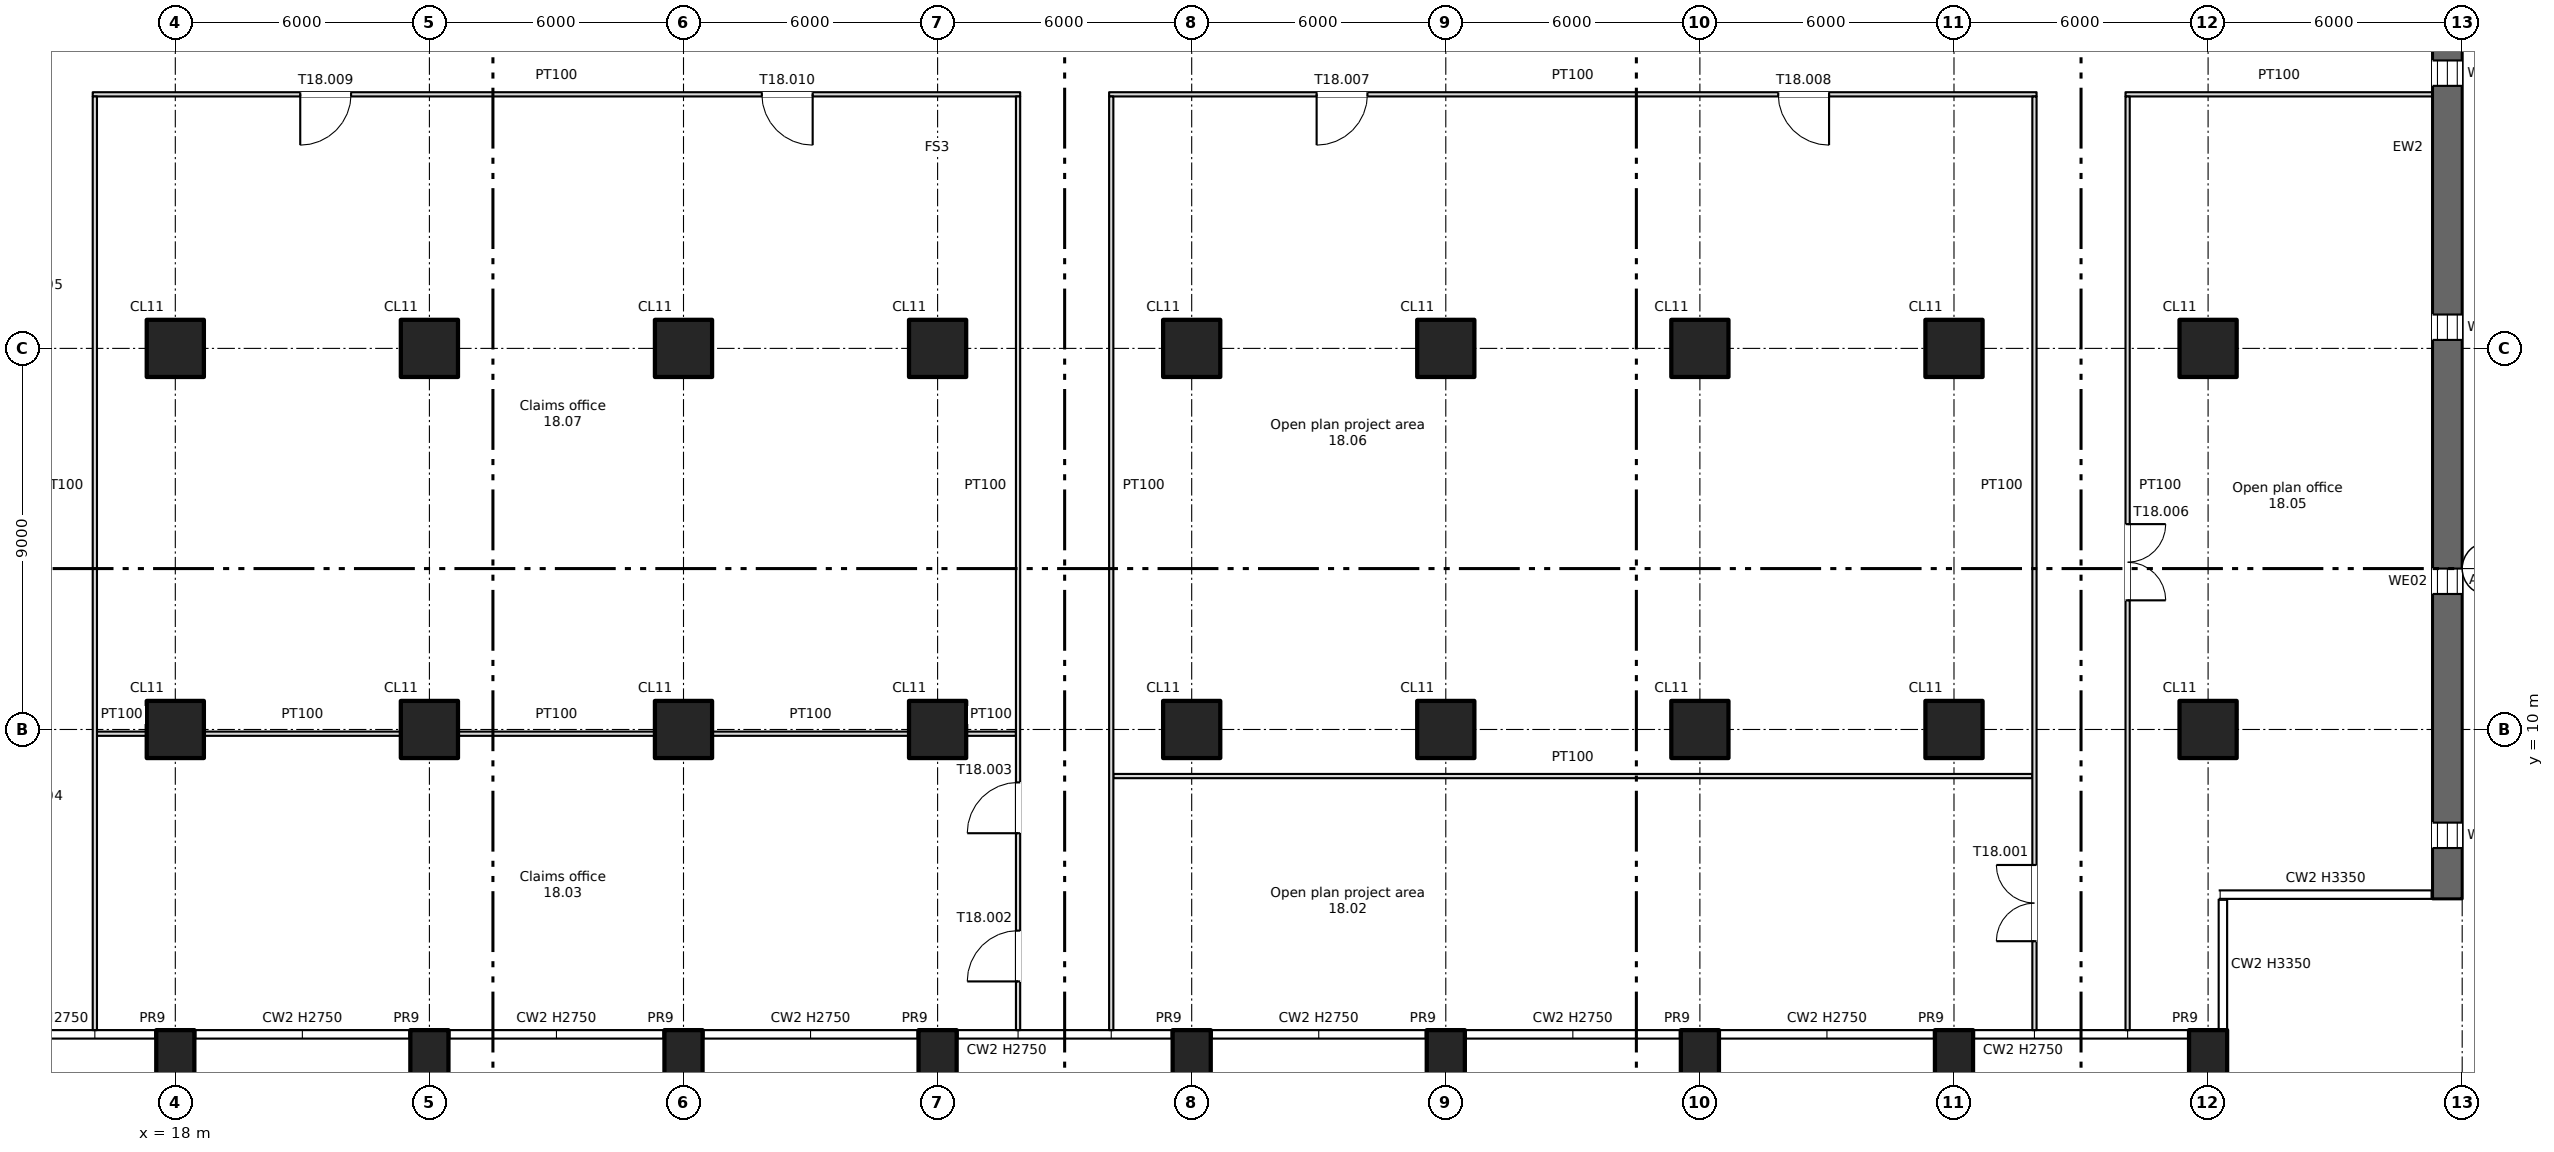
"""IFC4 building model, lengths in metres.
Left out: names, types, materials, properties, quantities, classifications, styles, units other than length and angle.
Written with IfcOpenShell. Run it as: python <this file> out.ifc"""

import sys

from ifc_helpers import new_model, si_unit, direction, frame, frame_2d, origin, origin_2d, place, context, subcontext, project, spatial, rectangle, extrude, element, fill, save


model = new_model("IFC4")
c1 = context("Model", 3, precision=1e-05, world=origin(), true_north=direction((0.0, 1.0)))
c2 = subcontext(c1, "Body", "Model", "MODEL_VIEW")
j1 = project(units=[si_unit("LENGTHUNIT", "METRE"), si_unit("PLANEANGLEUNIT", "RADIAN")], contexts=[c1])
p1 = place(None, origin())
s1 = spatial("IfcSite", under=j1, at=p1, CompositionType="ELEMENT")
p2 = place(p1, origin())
s2 = spatial("IfcBuilding", under=s1, at=p2, CompositionType="ELEMENT")
p3 = place(p2, frame((0.0, 0.0, 113.75)))
s3 = spatial("IfcBuildingStorey", under=s2, at=p3, CompositionType="ELEMENT", Elevation=113.75)
for number, where, z_axis, x_axis in (
    (1, (18.0, 2.2, -0.4), (0.0, 0.0, 1.0), (1.0, 0.0, 0.0)),
    (2, (24.0, 2.2, -0.4), (0.0, 0.0, 1.0), (1.0, 0.0, 0.0)),
    (3, (30.0, 2.2, -0.4), (0.0, 0.0, 1.0), (1.0, 0.0, 0.0)),
    (4, (36.0, 2.2, -0.4), (0.0, 0.0, 1.0), (1.0, 0.0, 0.0)),
    (5, (42.0, 2.2, -0.4), (0.0, 0.0, 1.0), (1.0, 0.0, 0.0)),
    (6, (48.0, 2.2, -0.4), (0.0, 0.0, 1.0), (1.0, 0.0, 0.0)),
    (7, (54.0, 2.2, -0.4), (0.0, 0.0, 1.0), (1.0, 0.0, 0.0)),
    (8, (60.0, 2.2, -0.4), (0.0, 0.0, 1.0), (1.0, 0.0, 0.0)),
    (9, (66.0, 2.2, -0.4), (0.0, 0.0, 1.0), (1.0, 0.0, 0.0)),
):
    element("IfcColumn", number, at=place(p3, frame(where, z_axis=z_axis, x_axis=x_axis)), inside=s3, PredefinedType="COLUMN", context=c2, shape_type="SweptSolid", body=[
        extrude(rectangle(XDim=0.9, YDim=1.4, at=origin_2d()), origin(), (0.0, 0.0, 1.0), 3.75),
    ])
for number, where, z_axis, x_axis in (
    (10, (18.0, 10.0, 0.0), (0.0, 0.0, 1.0), (1.0, 0.0, 0.0)),
    (11, (18.0, 19.0, 0.0), (0.0, 0.0, 1.0), (1.0, 0.0, 0.0)),
    (12, (24.0, 10.0, 0.0), (0.0, 0.0, 1.0), (1.0, 0.0, 0.0)),
    (13, (24.0, 19.0, 0.0), (0.0, 0.0, 1.0), (1.0, 0.0, 0.0)),
    (14, (30.0, 10.0, 0.0), (0.0, 0.0, 1.0), (1.0, 0.0, 0.0)),
    (15, (30.0, 19.0, 0.0), (0.0, 0.0, 1.0), (1.0, 0.0, 0.0)),
    (16, (36.0, 10.0, 0.0), (0.0, 0.0, 1.0), (1.0, 0.0, 0.0)),
    (17, (36.0, 19.0, 0.0), (0.0, 0.0, 1.0), (1.0, 0.0, 0.0)),
    (18, (42.0, 10.0, 0.0), (0.0, 0.0, 1.0), (1.0, 0.0, 0.0)),
    (19, (42.0, 19.0, 0.0), (0.0, 0.0, 1.0), (1.0, 0.0, 0.0)),
    (20, (48.0, 10.0, 0.0), (0.0, 0.0, 1.0), (1.0, 0.0, 0.0)),
    (21, (48.0, 19.0, 0.0), (0.0, 0.0, 1.0), (1.0, 0.0, 0.0)),
    (22, (54.0, 10.0, 0.0), (0.0, 0.0, 1.0), (1.0, 0.0, 0.0)),
    (23, (54.0, 19.0, 0.0), (0.0, 0.0, 1.0), (1.0, 0.0, 0.0)),
    (24, (60.0, 10.0, 0.0), (0.0, 0.0, 1.0), (1.0, 0.0, 0.0)),
    (25, (60.0, 19.0, 0.0), (0.0, 0.0, 1.0), (1.0, 0.0, 0.0)),
    (26, (66.0, 10.0, 0.0), (0.0, 0.0, 1.0), (1.0, 0.0, 0.0)),
    (27, (66.0, 19.0, 0.0), (0.0, 0.0, 1.0), (1.0, 0.0, 0.0)),
):
    element("IfcColumn", number, at=place(p3, frame(where, z_axis=z_axis, x_axis=x_axis)), inside=s3, PredefinedType="COLUMN", context=c2, shape_type="SweptSolid", body=[
        extrude(rectangle(XDim=1.35, YDim=1.35, at=origin_2d()), origin(), (0.0, 0.0, 1.0), 3.35),
    ])
p4 = place(p3, frame((71.65, 6.0, 0.0), z_axis=(0.0, 0.0, 1.0), x_axis=(0.0, 1.0, 0.0)))
e28 = element("IfcWall", 28, at=p4, inside=s3, PredefinedType="SHEAR", context=c2, shape_type="SweptSolid", body=[
    extrude(rectangle(XDim=35.5, YDim=0.7, at=frame_2d((17.75, 0.0))), origin(), (0.0, 0.0, 1.0), 3.35),
])
p5 = place(p4, frame((1.2, 0.0, 0.6)))
e29 = element("IfcOpeningElement", 29, at=p5, cuts=e28, PredefinedType="OPENING", context=c2, shape_type="SweptSolid", body=[
    extrude(rectangle(XDim=0.6, YDim=2.4, at=frame_2d((0.3, 1.2))), frame((0.0, 0.36, 0.0), z_axis=(0.0, -1.0, 0.0), x_axis=(1.0, 0.0, 0.0)), (0.0, 0.0, 1.0), 0.72),
])
p6 = place(p4, frame((7.2, 0.0, 0.6)))
e30 = element("IfcOpeningElement", 30, at=p6, cuts=e28, PredefinedType="OPENING", context=c2, shape_type="SweptSolid", body=[
    extrude(rectangle(XDim=0.6, YDim=2.4, at=frame_2d((0.3, 1.2))), frame((0.0, 0.36, 0.0), z_axis=(0.0, -1.0, 0.0), x_axis=(1.0, 0.0, 0.0)), (0.0, 0.0, 1.0), 0.72),
])
p7 = place(p4, frame((13.2, 0.0, 0.6)))
e31 = element("IfcOpeningElement", 31, at=p7, cuts=e28, PredefinedType="OPENING", context=c2, shape_type="SweptSolid", body=[
    extrude(rectangle(XDim=0.6, YDim=2.4, at=frame_2d((0.3, 1.2))), frame((0.0, 0.36, 0.0), z_axis=(0.0, -1.0, 0.0), x_axis=(1.0, 0.0, 0.0)), (0.0, 0.0, 1.0), 0.72),
])
p8 = place(p4, frame((19.2, 0.0, 0.6)))
e32 = element("IfcOpeningElement", 32, at=p8, cuts=e28, PredefinedType="OPENING", context=c2, shape_type="SweptSolid", body=[
    extrude(rectangle(XDim=0.6, YDim=2.4, at=frame_2d((0.3, 1.2))), frame((0.0, 0.36, 0.0), z_axis=(0.0, -1.0, 0.0), x_axis=(1.0, 0.0, 0.0)), (0.0, 0.0, 1.0), 0.72),
])
p9 = place(p4, frame((25.2, 0.0, 0.6)))
e33 = element("IfcOpeningElement", 33, at=p9, cuts=e28, PredefinedType="OPENING", context=c2, shape_type="SweptSolid", body=[
    extrude(rectangle(XDim=0.6, YDim=2.4, at=frame_2d((0.3, 1.2))), frame((0.0, 0.36, 0.0), z_axis=(0.0, -1.0, 0.0), x_axis=(1.0, 0.0, 0.0)), (0.0, 0.0, 1.0), 0.72),
])
p10 = place(p4, frame((31.2, 0.0, 0.6)))
e34 = element("IfcOpeningElement", 34, at=p10, cuts=e28, PredefinedType="OPENING", context=c2, shape_type="SweptSolid", body=[
    extrude(rectangle(XDim=0.6, YDim=2.4, at=frame_2d((0.3, 1.2))), frame((0.0, 0.36, 0.0), z_axis=(0.0, -1.0, 0.0), x_axis=(1.0, 0.0, 0.0)), (0.0, 0.0, 1.0), 0.72),
])
p11 = place(p3, frame((40.15, 8.9, 0.0), z_axis=(0.0, 0.0, 1.0), x_axis=(1.0, 0.0, 0.0)))
e35 = element("IfcWall", 35, at=p11, inside=s3, PredefinedType="PARTITIONING", context=c2, shape_type="SweptSolid", body=[
    extrude(rectangle(XDim=21.7, YDim=0.1, at=frame_2d((10.85, 0.0))), origin(), (0.0, 0.0, 1.0), 3.35),
])
p12 = place(p3, frame((36.675, 9.9, 0.0), z_axis=(0.0, 0.0, 1.0), x_axis=(1.0, 0.0, 0.0)))
e36 = element("IfcWall", 36, at=p12, inside=s3, PredefinedType="PARTITIONING", context=c2, shape_type="SweptSolid", body=[
    extrude(rectangle(XDim=1.175, YDim=0.1, at=frame_2d((0.587, 0.0))), origin(), (0.0, 0.0, 1.0), 3.35),
])
for number, where, z_axis, x_axis in (
    (37, (30.675, 9.9, 0.0), (0.0, 0.0, 1.0), (1.0, 0.0, 0.0)),
    (38, (24.675, 9.9, 0.0), (0.0, 0.0, 1.0), (1.0, 0.0, 0.0)),
    (39, (18.675, 9.9, 0.0), (0.0, 0.0, 1.0), (1.0, 0.0, 0.0)),
):
    element("IfcWall", number, at=place(p3, frame(where, z_axis=z_axis, x_axis=x_axis)), inside=s3, PredefinedType="PARTITIONING", context=c2, shape_type="SweptSolid", body=[
        extrude(rectangle(XDim=4.65, YDim=0.1, at=frame_2d((2.325, 0.0))), origin(), (0.0, 0.0, 1.0), 3.35),
    ])
p13 = place(p3, frame((16.15, 9.9, 0.0), z_axis=(0.0, 0.0, 1.0), x_axis=(1.0, 0.0, 0.0)))
e40 = element("IfcWall", 40, at=p13, inside=s3, PredefinedType="PARTITIONING", context=c2, shape_type="SweptSolid", body=[
    extrude(rectangle(XDim=1.175, YDim=0.1, at=frame_2d((0.587, 0.0))), origin(), (0.0, 0.0, 1.0), 3.35),
])
p14 = place(p3, frame((16.05, 25.0, 0.0), z_axis=(0.0, 0.0, 1.0), x_axis=(1.0, 0.0, 0.0)))
e41 = element("IfcWall", 41, at=p14, inside=s3, PredefinedType="PARTITIONING", context=c2, shape_type="SweptSolid", body=[
    extrude(rectangle(XDim=21.9, YDim=0.1, at=frame_2d((10.95, 0.0))), origin(), (0.0, 0.0, 1.0), 3.35),
])
p15 = place(p14, frame((4.9, 0.0, 0.0)))
e42 = element("IfcOpeningElement", 42, at=p15, cuts=e41, PredefinedType="OPENING", context=c2, shape_type="SweptSolid", body=[
    extrude(rectangle(XDim=1.2, YDim=2.1, at=frame_2d((0.6, 1.05))), frame((0.0, 0.06, 0.0), z_axis=(0.0, -1.0, 0.0), x_axis=(1.0, 0.0, 0.0)), (0.0, 0.0, 1.0), 0.12),
])
p16 = place(p14, frame((15.8, 0.0, 0.0)))
e43 = element("IfcOpeningElement", 43, at=p16, cuts=e41, PredefinedType="OPENING", context=c2, shape_type="SweptSolid", body=[
    extrude(rectangle(XDim=1.2, YDim=2.1, at=frame_2d((0.6, 1.05))), frame((0.0, 0.06, 0.0), z_axis=(0.0, -1.0, 0.0), x_axis=(1.0, 0.0, 0.0)), (0.0, 0.0, 1.0), 0.12),
])
p17 = place(p3, frame((40.05, 25.0, 0.0), z_axis=(0.0, 0.0, 1.0), x_axis=(1.0, 0.0, 0.0)))
e44 = element("IfcWall", 44, at=p17, inside=s3, PredefinedType="PARTITIONING", context=c2, shape_type="SweptSolid", body=[
    extrude(rectangle(XDim=21.9, YDim=0.1, at=frame_2d((10.95, 0.0))), origin(), (0.0, 0.0, 1.0), 3.35),
])
p18 = place(p17, frame((4.9, 0.0, 0.0)))
e45 = element("IfcOpeningElement", 45, at=p18, cuts=e44, PredefinedType="OPENING", context=c2, shape_type="SweptSolid", body=[
    extrude(rectangle(XDim=1.2, YDim=2.1, at=frame_2d((0.6, 1.05))), frame((0.0, 0.06, 0.0), z_axis=(0.0, -1.0, 0.0), x_axis=(1.0, 0.0, 0.0)), (0.0, 0.0, 1.0), 0.12),
])
p19 = place(p17, frame((15.8, 0.0, 0.0)))
e46 = element("IfcOpeningElement", 46, at=p19, cuts=e44, PredefinedType="OPENING", context=c2, shape_type="SweptSolid", body=[
    extrude(rectangle(XDim=1.2, YDim=2.1, at=frame_2d((0.6, 1.05))), frame((0.0, 0.06, 0.0), z_axis=(0.0, -1.0, 0.0), x_axis=(1.0, 0.0, 0.0)), (0.0, 0.0, 1.0), 0.12),
])
p20 = place(p3, frame((64.05, 25.0, 0.0), z_axis=(0.0, 0.0, 1.0), x_axis=(1.0, 0.0, 0.0)))
e47 = element("IfcWall", 47, at=p20, inside=s3, PredefinedType="PARTITIONING", context=c2, shape_type="SweptSolid", body=[
    extrude(rectangle(XDim=7.25, YDim=0.1, at=frame_2d((3.625, 0.0))), origin(), (0.0, 0.0, 1.0), 3.35),
])
p21 = place(p3, frame((16.1, 2.9, 0.0), z_axis=(0.0, 0.0, 1.0), x_axis=(0.0, 1.0, 0.0)))
e48 = element("IfcWall", 48, at=p21, inside=s3, PredefinedType="PARTITIONING", context=c2, shape_type="SweptSolid", body=[
    extrude(rectangle(XDim=22.05, YDim=0.1, at=frame_2d((11.025, 0.0))), origin(), (0.0, 0.0, 1.0), 3.35),
])
p22 = place(p3, frame((37.9, 2.9, 0.0), z_axis=(0.0, 0.0, 1.0), x_axis=(0.0, 1.0, 0.0)))
e49 = element("IfcWall", 49, at=p22, inside=s3, PredefinedType="PARTITIONING", context=c2, shape_type="SweptSolid", body=[
    extrude(rectangle(XDim=22.05, YDim=0.1, at=frame_2d((11.025, 0.0))), origin(), (0.0, 0.0, 1.0), 3.35),
])
p23 = place(p22, frame((1.15, 0.0, 0.0)))
e50 = element("IfcOpeningElement", 50, at=p23, cuts=e49, PredefinedType="OPENING", context=c2, shape_type="SweptSolid", body=[
    extrude(rectangle(XDim=1.2, YDim=2.1, at=frame_2d((0.6, 1.05))), frame((0.0, 0.06, 0.0), z_axis=(0.0, -1.0, 0.0), x_axis=(1.0, 0.0, 0.0)), (0.0, 0.0, 1.0), 0.12),
])
p24 = place(p22, frame((4.65, 0.0, 0.0)))
e51 = element("IfcOpeningElement", 51, at=p24, cuts=e49, PredefinedType="OPENING", context=c2, shape_type="SweptSolid", body=[
    extrude(rectangle(XDim=1.2, YDim=2.1, at=frame_2d((0.6, 1.05))), frame((0.0, 0.06, 0.0), z_axis=(0.0, -1.0, 0.0), x_axis=(1.0, 0.0, 0.0)), (0.0, 0.0, 1.0), 0.12),
])
p25 = place(p3, frame((40.1, 2.9, 0.0), z_axis=(0.0, 0.0, 1.0), x_axis=(0.0, 1.0, 0.0)))
e52 = element("IfcWall", 52, at=p25, inside=s3, PredefinedType="PARTITIONING", context=c2, shape_type="SweptSolid", body=[
    extrude(rectangle(XDim=22.05, YDim=0.1, at=frame_2d((11.025, 0.0))), origin(), (0.0, 0.0, 1.0), 3.35),
])
p26 = place(p3, frame((61.9, 2.9, 0.0), z_axis=(0.0, 0.0, 1.0), x_axis=(0.0, 1.0, 0.0)))
e53 = element("IfcWall", 53, at=p26, inside=s3, PredefinedType="PARTITIONING", context=c2, shape_type="SweptSolid", body=[
    extrude(rectangle(XDim=22.05, YDim=0.1, at=frame_2d((11.025, 0.0))), origin(), (0.0, 0.0, 1.0), 3.35),
])
p27 = place(p26, frame((2.1, 0.0, 0.0)))
e54 = element("IfcOpeningElement", 54, at=p27, cuts=e53, PredefinedType="OPENING", context=c2, shape_type="SweptSolid", body=[
    extrude(rectangle(XDim=1.8, YDim=2.1, at=frame_2d((0.9, 1.05))), frame((0.0, 0.06, 0.0), z_axis=(0.0, -1.0, 0.0), x_axis=(1.0, 0.0, 0.0)), (0.0, 0.0, 1.0), 0.12),
])
p28 = place(p3, frame((64.1, 2.9, 0.0), z_axis=(0.0, 0.0, 1.0), x_axis=(0.0, 1.0, 0.0)))
e55 = element("IfcWall", 55, at=p28, inside=s3, PredefinedType="PARTITIONING", context=c2, shape_type="SweptSolid", body=[
    extrude(rectangle(XDim=22.05, YDim=0.1, at=frame_2d((11.025, 0.0))), origin(), (0.0, 0.0, 1.0), 3.35),
])
p29 = place(p28, frame((10.15, 0.0, 0.0)))
e56 = element("IfcOpeningElement", 56, at=p29, cuts=e55, PredefinedType="OPENING", context=c2, shape_type="SweptSolid", body=[
    extrude(rectangle(XDim=1.8, YDim=2.1, at=frame_2d((0.9, 1.05))), frame((0.0, 0.06, 0.0), z_axis=(0.0, -1.0, 0.0), x_axis=(1.0, 0.0, 0.0)), (0.0, 0.0, 1.0), 0.12),
])
p30 = place(p5, origin())
e57 = element("IfcWindow", 57, at=p30, inside=s3, PartitioningType="SINGLE_PANEL", PredefinedType="WINDOW", context=c2, shape_type="SweptSolid", body=[
    extrude(rectangle(XDim=0.6, YDim=2.4, at=frame_2d((0.3, 1.2))), frame((0.0, 0.03, 0.0), z_axis=(0.0, -1.0, 0.0), x_axis=(1.0, 0.0, 0.0)), (0.0, 0.0, 1.0), 0.06),
])
fill(e29, e57)
p31 = place(p6, origin())
e58 = element("IfcWindow", 58, at=p31, inside=s3, PartitioningType="SINGLE_PANEL", PredefinedType="WINDOW", context=c2, shape_type="SweptSolid", body=[
    extrude(rectangle(XDim=0.6, YDim=2.4, at=frame_2d((0.3, 1.2))), frame((0.0, 0.03, 0.0), z_axis=(0.0, -1.0, 0.0), x_axis=(1.0, 0.0, 0.0)), (0.0, 0.0, 1.0), 0.06),
])
fill(e30, e58)
p32 = place(p7, origin())
e59 = element("IfcWindow", 59, at=p32, inside=s3, PartitioningType="SINGLE_PANEL", PredefinedType="WINDOW", context=c2, shape_type="SweptSolid", body=[
    extrude(rectangle(XDim=0.6, YDim=2.4, at=frame_2d((0.3, 1.2))), frame((0.0, 0.03, 0.0), z_axis=(0.0, -1.0, 0.0), x_axis=(1.0, 0.0, 0.0)), (0.0, 0.0, 1.0), 0.06),
])
fill(e31, e59)
p33 = place(p8, origin())
e60 = element("IfcWindow", 60, at=p33, inside=s3, PartitioningType="SINGLE_PANEL", PredefinedType="WINDOW", context=c2, shape_type="SweptSolid", body=[
    extrude(rectangle(XDim=0.6, YDim=2.4, at=frame_2d((0.3, 1.2))), frame((0.0, 0.03, 0.0), z_axis=(0.0, -1.0, 0.0), x_axis=(1.0, 0.0, 0.0)), (0.0, 0.0, 1.0), 0.06),
])
fill(e32, e60)
p34 = place(p27, origin())
e61 = element("IfcDoor", 61, at=p34, inside=s3, OperationType="DOUBLE_DOOR_SINGLE_SWING", PredefinedType="DOOR", context=c2, shape_type="SweptSolid", body=[
    extrude(rectangle(XDim=1.8, YDim=2.1, at=frame_2d((0.9, 1.05))), frame((0.0, 0.025, 0.0), z_axis=(0.0, -1.0, 0.0), x_axis=(1.0, 0.0, 0.0)), (0.0, 0.0, 1.0), 0.05),
])
fill(e54, e61)
p35 = place(p23, origin())
e62 = element("IfcDoor", 62, at=p35, inside=s3, OperationType="SINGLE_SWING_LEFT", PredefinedType="DOOR", context=c2, shape_type="SweptSolid", body=[
    extrude(rectangle(XDim=1.2, YDim=2.1, at=frame_2d((0.6, 1.05))), frame((0.0, 0.025, 0.0), z_axis=(0.0, -1.0, 0.0), x_axis=(1.0, 0.0, 0.0)), (0.0, 0.0, 1.0), 0.05),
])
fill(e50, e62)
p36 = place(p24, origin())
e63 = element("IfcDoor", 63, at=p36, inside=s3, OperationType="SINGLE_SWING_LEFT", PredefinedType="DOOR", context=c2, shape_type="SweptSolid", body=[
    extrude(rectangle(XDim=1.2, YDim=2.1, at=frame_2d((0.6, 1.05))), frame((0.0, 0.025, 0.0), z_axis=(0.0, -1.0, 0.0), x_axis=(1.0, 0.0, 0.0)), (0.0, 0.0, 1.0), 0.05),
])
fill(e51, e63)
p37 = place(p29, origin())
e64 = element("IfcDoor", 64, at=p37, inside=s3, OperationType="DOUBLE_DOOR_SINGLE_SWING", PredefinedType="DOOR", context=c2, shape_type="SweptSolid", body=[
    extrude(rectangle(XDim=1.8, YDim=2.1, at=frame_2d((0.9, 1.05))), frame((0.0, 0.025, 0.0), z_axis=(0.0, -1.0, 0.0), x_axis=(1.0, 0.0, 0.0)), (0.0, 0.0, 1.0), 0.05),
])
fill(e56, e64)
p38 = place(p18, origin())
e65 = element("IfcDoor", 65, at=p38, inside=s3, OperationType="SINGLE_SWING_LEFT", PredefinedType="DOOR", context=c2, shape_type="SweptSolid", body=[
    extrude(rectangle(XDim=1.2, YDim=2.1, at=frame_2d((0.6, 1.05))), frame((0.0, 0.025, 0.0), z_axis=(0.0, -1.0, 0.0), x_axis=(1.0, 0.0, 0.0)), (0.0, 0.0, 1.0), 0.05),
])
fill(e45, e65)
p39 = place(p19, origin())
e66 = element("IfcDoor", 66, at=p39, inside=s3, OperationType="SINGLE_SWING_RIGHT", PredefinedType="DOOR", context=c2, shape_type="SweptSolid", body=[
    extrude(rectangle(XDim=1.2, YDim=2.1, at=frame_2d((0.6, 1.05))), frame((0.0, 0.025, 0.0), z_axis=(0.0, -1.0, 0.0), x_axis=(1.0, 0.0, 0.0)), (0.0, 0.0, 1.0), 0.05),
])
fill(e46, e66)
p40 = place(p15, origin())
e67 = element("IfcDoor", 67, at=p40, inside=s3, OperationType="SINGLE_SWING_LEFT", PredefinedType="DOOR", context=c2, shape_type="SweptSolid", body=[
    extrude(rectangle(XDim=1.2, YDim=2.1, at=frame_2d((0.6, 1.05))), frame((0.0, 0.025, 0.0), z_axis=(0.0, -1.0, 0.0), x_axis=(1.0, 0.0, 0.0)), (0.0, 0.0, 1.0), 0.05),
])
fill(e42, e67)
p41 = place(p16, origin())
e68 = element("IfcDoor", 68, at=p41, inside=s3, OperationType="SINGLE_SWING_RIGHT", PredefinedType="DOOR", context=c2, shape_type="SweptSolid", body=[
    extrude(rectangle(XDim=1.2, YDim=2.1, at=frame_2d((0.6, 1.05))), frame((0.0, 0.025, 0.0), z_axis=(0.0, -1.0, 0.0), x_axis=(1.0, 0.0, 0.0)), (0.0, 0.0, 1.0), 0.05),
])
fill(e43, e68)
save(model, sys.argv[1])
